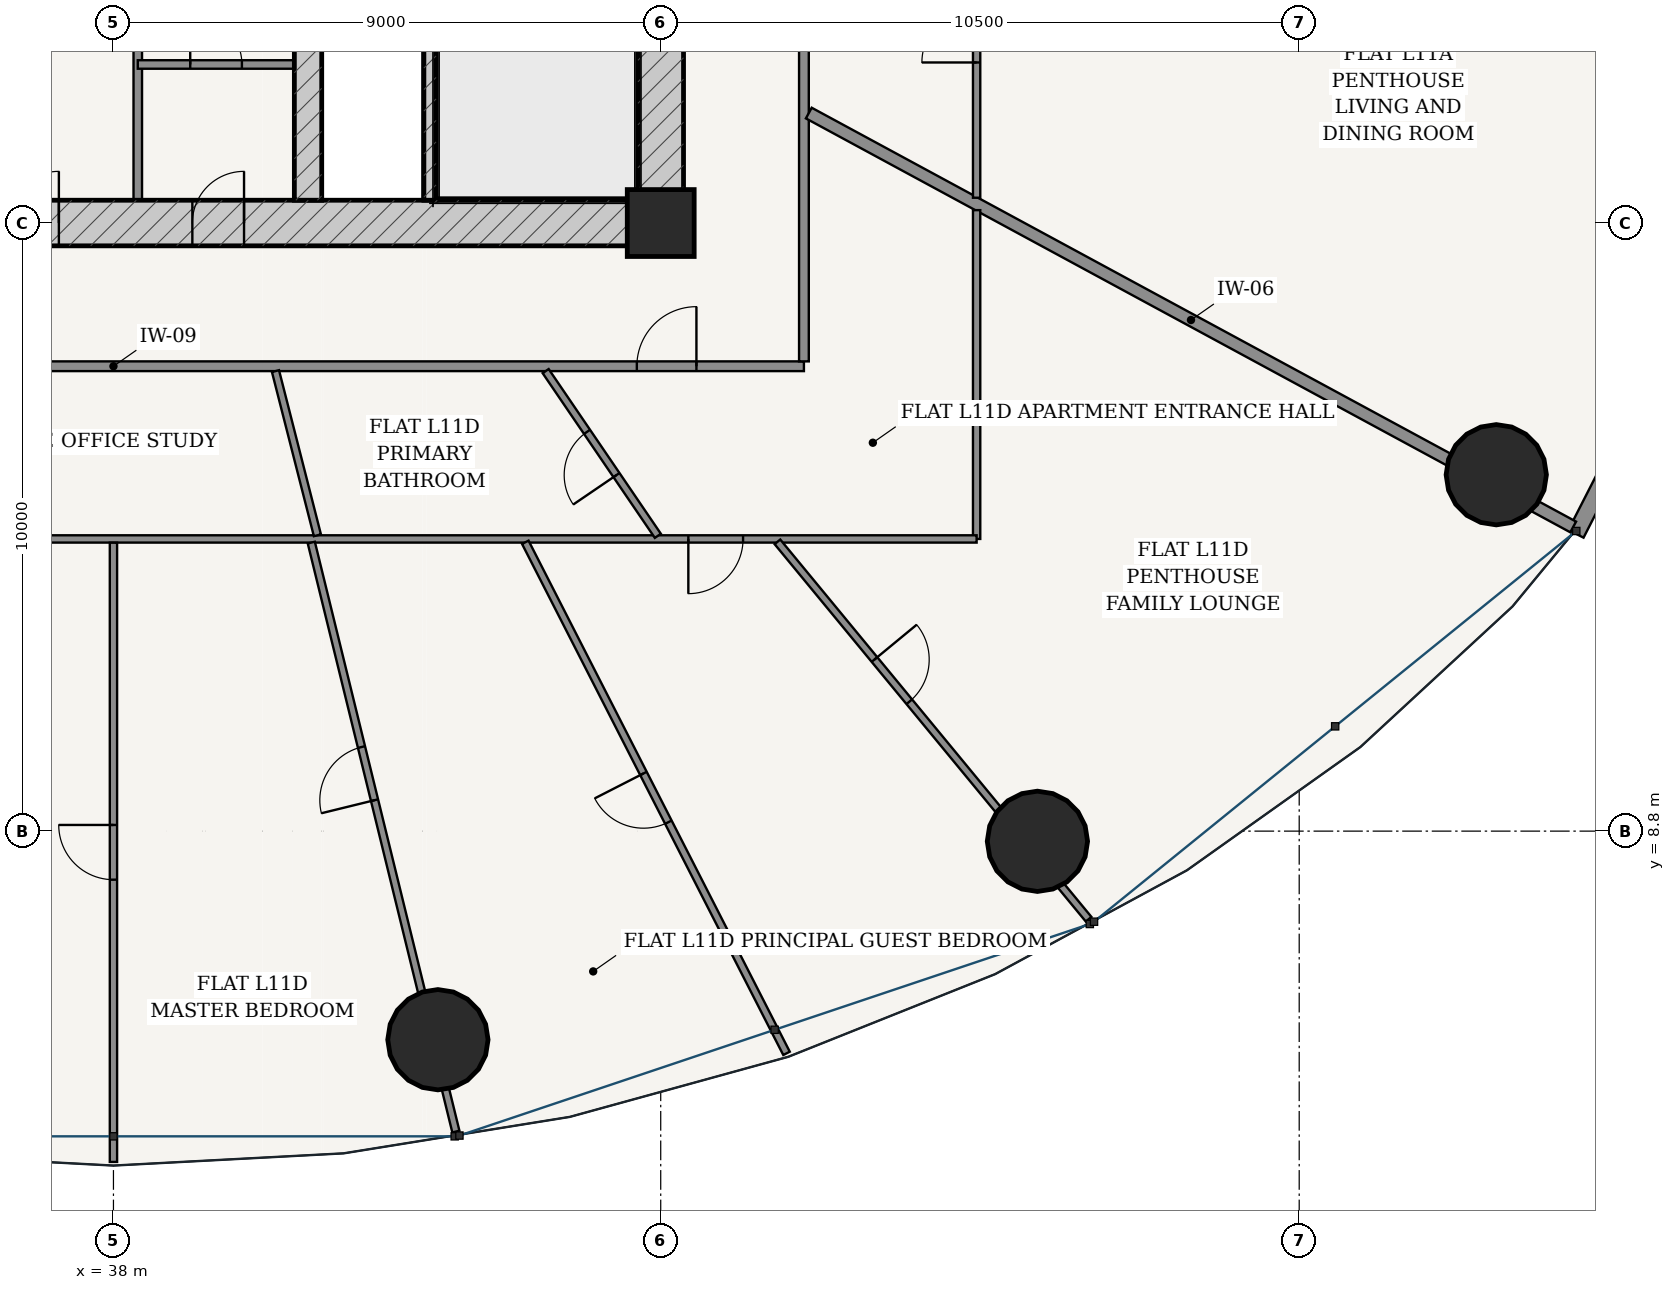
"""IFC4 building model, lengths in metres.
Left out: names, types, materials, properties, quantities, classifications, styles, units other than length and angle.
Written with IfcOpenShell. Run it as: python <this file> out.ifc"""

import sys

from ifc_helpers import new_model, si_unit, direction, frame, frame_2d, origin, origin_2d, place, context, subcontext, project, spatial, rectangle, hollow_circle, extrude, source, transform, mapped, element, fill, save


model = new_model("IFC4")
c1 = context("Model", 3, precision=1e-05, world=origin(), true_north=direction((-0.2419218956, 0.970295726276)))
c2 = subcontext(c1, "Body", "Model", "MODEL_VIEW")
j1 = project(units=[si_unit("LENGTHUNIT", "METRE"), si_unit("PLANEANGLEUNIT", "RADIAN")], contexts=[c1])
p1 = place(None, origin())
s1 = spatial("IfcSite", under=j1, at=p1, CompositionType="ELEMENT")
p2 = place(p1, origin())
s2 = spatial("IfcBuilding", under=s1, at=p2, CompositionType="ELEMENT")
p3 = place(p2, frame((0.0, 0.0, 45.6)))
s3 = spatial("IfcBuildingStorey", under=s2, at=p3, CompositionType="ELEMENT", Elevation=45.6)
p4 = place(p3, frame((47.0, 18.8, 0.0), z_axis=(0.0, 0.0, 1.0), x_axis=(1.0, 0.0, 0.0)))
e1 = element("IfcColumn", 1, at=p4, inside=s3, PredefinedType="COLUMN", context=c2, shape_type="SweptSolid", body=[
    extrude(rectangle(XDim=1.1, YDim=1.1, at=origin_2d()), origin(), (0.0, 0.0, 1.0), 3.6),
])
p5 = place(p3, frame((28.625, 18.8, 0.0), z_axis=(0.0, 0.0, 1.0), x_axis=(1.0, 0.0, 0.0)))
e2 = element("IfcWall", 2, at=p5, inside=s3, PredefinedType="SHEAR", context=c2, shape_type="SweptSolid", body=[
    extrude(rectangle(XDim=18.75, YDim=0.75, at=frame_2d((9.375, 0.0))), origin(), (0.0, 0.0, 1.0), 3.32),
])
p6 = place(p5, frame((7.627, 0.0, 0.0)))
e3 = element("IfcOpeningElement", 3, at=p6, cuts=e2, PredefinedType="OPENING", context=c2, shape_type="SweptSolid", body=[
    extrude(rectangle(XDim=0.85, YDim=2.1, at=frame_2d((0.425, 1.05))), frame((0.0, 0.385, 0.0), z_axis=(0.0, -1.0, 0.0), x_axis=(1.0, 0.0, 0.0)), (0.0, 0.0, 1.0), 0.77),
])
p7 = place(p5, frame((10.673, 0.0, 0.0)))
e4 = element("IfcOpeningElement", 4, at=p7, cuts=e2, PredefinedType="OPENING", context=c2, shape_type="SweptSolid", body=[
    extrude(rectangle(XDim=0.85, YDim=2.1, at=frame_2d((0.425, 1.05))), frame((0.0, 0.385, 0.0), z_axis=(0.0, -1.0, 0.0), x_axis=(1.0, 0.0, 0.0)), (0.0, 0.0, 1.0), 0.77),
])
p8 = place(p3, frame((47.0, 19.175, 0.0), z_axis=(0.0, 0.0, 1.0), x_axis=(0.0, 1.0, 0.0)))
e5 = element("IfcWall", 5, at=p8, inside=s3, PredefinedType="SHEAR", context=c2, shape_type="SweptSolid", body=[
    extrude(rectangle(XDim=15.25, YDim=0.75, at=frame_2d((7.625, 0.0))), origin(), (0.0, 0.0, 1.0), 3.32),
])
p9 = place(p8, frame((9.875, 0.0, 0.0)))
e6 = element("IfcOpeningElement", 6, at=p9, cuts=e5, PredefinedType="OPENING", context=c2, shape_type="SweptSolid", body=[
    extrude(rectangle(XDim=1.5, YDim=2.2, at=frame_2d((0.75, 1.1))), frame((0.0, 0.385, 0.0), z_axis=(0.0, -1.0, 0.0), x_axis=(1.0, 0.0, 0.0)), (0.0, 0.0, 1.0), 0.77),
])
p10 = place(p3, frame((43.205, 19.175, 0.0), z_axis=(0.0, 0.0, 1.0), x_axis=(0.0, 1.0, 0.0)))
e7 = element("IfcWall", 7, at=p10, inside=s3, PredefinedType="SOLIDWALL", context=c2, shape_type="SweptSolid", body=[
    extrude(rectangle(XDim=7.375, YDim=0.2, at=frame_2d((3.688, 0.0))), origin(), (0.0, 0.0, 1.0), 3.32),
])
p11 = place(p3, frame((41.2, 19.175, 0.0), z_axis=(0.0, 0.0, 1.0), x_axis=(0.0, 1.0, 0.0)))
e8 = element("IfcWall", 8, at=p11, inside=s3, PredefinedType="SHEAR", context=c2, shape_type="SweptSolid", body=[
    extrude(rectangle(XDim=15.25, YDim=0.45, at=frame_2d((7.625, 0.0))), origin(), (0.0, 0.0, 1.0), 3.32),
])
p12 = place(p11, frame((7.8, 0.0, 0.0)))
e9 = element("IfcOpeningElement", 9, at=p12, cuts=e8, PredefinedType="OPENING", context=c2, shape_type="SweptSolid", body=[
    extrude(rectangle(XDim=1.05, YDim=2.15, at=frame_2d((0.525, 1.075))), frame((0.0, 0.235, 0.0), z_axis=(0.0, -1.0, 0.0), x_axis=(1.0, 0.0, 0.0)), (0.0, 0.0, 1.0), 0.47),
])
for number, where, z_axis, x_axis in (
    (10, (43.336, 5.37, 0.0), (0.0, 0.0, 1.0), (1.0, 0.0, 0.0)),
    (11, (53.195, 8.632, 0.0), (0.0, 0.0, 1.0), (1.0, 0.0, 0.0)),
    (12, (60.741, 14.661, 0.0), (0.0, 0.0, 1.0), (1.0, 0.0, 0.0)),
):
    element("IfcColumn", number, at=place(p3, frame(where, z_axis=z_axis, x_axis=x_axis)), inside=s3, PredefinedType="COLUMN", context=c2, shape_type="SweptSolid", body=[
        extrude(hollow_circle(Radius=0.825, WallThickness=0.05, at=origin_2d()), origin(), (0.0, 0.0, 1.0), 3.6),
    ])
p13 = place(p3, frame((62.051, 13.689, 0.0), z_axis=(0.0, 0.0, 1.0), x_axis=(0.455220575541, 0.890378698984, 0.0)))
e13 = element("IfcWall", 13, at=p13, inside=s3, PredefinedType="SOLIDWALL", context=c2, shape_type="SweptSolid", body=[
    extrude(rectangle(XDim=9.662, YDim=0.28, at=frame_2d((4.831, 0.0))), origin(), (0.0, 0.0, 1.0), 3.32),
])
p14 = place(p13, frame((1.559, 0.0, 0.85)))
e14 = element("IfcOpeningElement", 14, at=p14, cuts=e13, PredefinedType="OPENING", context=c2, shape_type="SweptSolid", body=[
    extrude(rectangle(XDim=2.1, YDim=1.95, at=frame_2d((1.05, 0.975))), frame((0.0, 0.15, 0.0), z_axis=(0.0, -1.0, 0.0), x_axis=(1.0, 0.0, 0.0)), (0.0, 0.0, 1.0), 0.3),
])
p15 = place(p13, frame((6.003, 0.0, 0.85)))
e15 = element("IfcOpeningElement", 15, at=p15, cuts=e13, PredefinedType="OPENING", context=c2, shape_type="SweptSolid", body=[
    extrude(rectangle(XDim=2.1, YDim=1.95, at=frame_2d((1.05, 0.975))), frame((0.0, 0.15, 0.0), z_axis=(0.0, -1.0, 0.0), x_axis=(1.0, 0.0, 0.0)), (0.0, 0.0, 1.0), 0.3),
])
p16 = place(p3, frame((38.4, 19.175, 0.0), z_axis=(0.0, 0.0, 1.0), x_axis=(0.0, 1.0, 0.0)))
e16 = element("IfcWall", 16, at=p16, inside=s3, PredefinedType="PARTITIONING", context=c2, shape_type="SweptSolid", body=[
    extrude(rectangle(XDim=4.465, YDim=0.14, at=frame_2d((2.232, 0.0))), origin(), (0.0, 0.0, 1.0), 3.32),
])
p17 = place(p3, frame((38.4, 21.407, 0.0), z_axis=(0.0, 0.0, 1.0), x_axis=(1.0, 0.0, 0.0)))
e17 = element("IfcWall", 17, at=p17, inside=s3, PredefinedType="PARTITIONING", context=c2, shape_type="SweptSolid", body=[
    extrude(rectangle(XDim=2.575, YDim=0.14, at=frame_2d((1.288, 0.0))), origin(), (0.0, 0.0, 1.0), 3.32),
])
p18 = place(p17, frame((0.863, 0.0, 0.0)))
e18 = element("IfcOpeningElement", 18, at=p18, cuts=e17, PredefinedType="OPENING", context=c2, shape_type="SweptSolid", body=[
    extrude(rectangle(XDim=0.85, YDim=2.1, at=frame_2d((0.425, 1.05))), frame((0.0, 0.08, 0.0), z_axis=(0.0, -1.0, 0.0), x_axis=(1.0, 0.0, 0.0)), (0.0, 0.0, 1.0), 0.16),
])
p19 = place(p3, frame((26.645, 16.445, 0.0), z_axis=(0.0, 0.0, 1.0), x_axis=(1.0, 0.0, 0.0)))
e19 = element("IfcWall", 19, at=p19, inside=s3, PredefinedType="PARTITIONING", context=c2, shape_type="SweptSolid", body=[
    extrude(rectangle(XDim=22.71, YDim=0.16, at=frame_2d((11.355, 0.0))), origin(), (0.0, 0.0, 1.0), 2.688),
])
p20 = place(p19, frame((19.962, 0.0, 0.0)))
e20 = element("IfcOpeningElement", 20, at=p20, cuts=e19, PredefinedType="OPENING", context=c2, shape_type="SweptSolid", body=[
    extrude(rectangle(XDim=0.98, YDim=2.2, at=frame_2d((0.49, 1.1))), frame((0.0, 0.09, 0.0), z_axis=(0.0, -1.0, 0.0), x_axis=(1.0, 0.0, 0.0)), (0.0, 0.0, 1.0), 0.18),
])
p21 = place(p3, frame((49.355, 16.525, 0.0), z_axis=(0.0, 0.0, 1.0), x_axis=(0.0, 1.0, 0.0)))
e21 = element("IfcWall", 21, at=p21, inside=s3, PredefinedType="PARTITIONING", context=c2, shape_type="SweptSolid", body=[
    extrude(rectangle(XDim=20.55, YDim=0.16, at=frame_2d((10.275, 0.0))), origin(), (0.0, 0.0, 1.0), 2.688),
])
p22 = place(p3, frame((49.435, 20.608, 0.0), z_axis=(0.0, 0.0, 1.0), x_axis=(0.879369737803, -0.476139542819, 0.0)))
e22 = element("IfcWall", 22, at=p22, inside=s3, PredefinedType="PARTITIONING", context=c2, shape_type="SweptSolid", body=[
    extrude(rectangle(XDim=14.295, YDim=0.2, at=frame_2d((7.147, 0.0))), origin(), (0.0, 0.0, 1.0), 2.688),
])
p23 = place(p3, frame((52.195, 39.995, 0.0), z_axis=(0.0, 0.0, 1.0), x_axis=(0.0, -1.0, 0.0)))
e23 = element("IfcWall", 23, at=p23, inside=s3, PredefinedType="PARTITIONING", context=c2, shape_type="SweptSolid", body=[
    extrude(rectangle(XDim=20.779, YDim=0.12, at=frame_2d((10.39, 0.0))), origin(), (0.0, 0.0, 1.0), 2.688),
])
p24 = place(p23, frame((13.944, 0.0, 0.0)))
e24 = element("IfcOpeningElement", 24, at=p24, cuts=e23, PredefinedType="OPENING", context=c2, shape_type="SweptSolid", body=[
    extrude(rectangle(XDim=0.9, YDim=2.15, at=frame_2d((0.45, 1.075))), frame((0.0, 0.07, 0.0), z_axis=(0.0, -1.0, 0.0), x_axis=(1.0, 0.0, 0.0)), (0.0, 0.0, 1.0), 0.14),
])
p25 = place(p23, frame((17.655, 0.0, 0.0)))
e25 = element("IfcOpeningElement", 25, at=p25, cuts=e23, PredefinedType="OPENING", context=c2, shape_type="SweptSolid", body=[
    extrude(rectangle(XDim=0.9, YDim=2.15, at=frame_2d((0.45, 1.075))), frame((0.0, 0.07, 0.0), z_axis=(0.0, -1.0, 0.0), x_axis=(1.0, 0.0, 0.0)), (0.0, 0.0, 1.0), 0.14),
])
p26 = place(p3, frame((52.195, 19.012, 0.0), z_axis=(0.0, 0.0, 1.0), x_axis=(0.0, -1.0, 0.0)))
e26 = element("IfcWall", 26, at=p26, inside=s3, PredefinedType="PARTITIONING", context=c2, shape_type="SweptSolid", body=[
    extrude(rectangle(XDim=5.407, YDim=0.12, at=frame_2d((2.704, 0.0))), origin(), (0.0, 0.0, 1.0), 2.999),
])
p27 = place(p3, frame((52.195, 13.605, 0.0), z_axis=(0.0, 0.0, 1.0), x_axis=(-1.0, 0.0, 0.0)))
e27 = element("IfcWall", 27, at=p27, inside=s3, PredefinedType="PARTITIONING", context=c2, shape_type="SweptSolid", body=[
    extrude(rectangle(XDim=24.973, YDim=0.12, at=frame_2d((12.487, 0.0))), origin(), (0.0, 0.0, 1.0), 2.688),
])
p28 = place(p27, frame((3.841, 0.0, 0.0)))
e28 = element("IfcOpeningElement", 28, at=p28, cuts=e27, PredefinedType="OPENING", context=c2, shape_type="SweptSolid", body=[
    extrude(rectangle(XDim=0.9, YDim=2.15, at=frame_2d((0.45, 1.075))), frame((0.0, 0.07, 0.0), z_axis=(0.0, -1.0, 0.0), x_axis=(1.0, 0.0, 0.0)), (0.0, 0.0, 1.0), 0.14),
])
p29 = place(p27, frame((15.819, 0.0, 0.0)))
e29 = element("IfcOpeningElement", 29, at=p29, cuts=e27, PredefinedType="OPENING", context=c2, shape_type="SweptSolid", body=[
    extrude(rectangle(XDim=0.9, YDim=2.15, at=frame_2d((0.45, 1.075))), frame((0.0, 0.07, 0.0), z_axis=(0.0, -1.0, 0.0), x_axis=(1.0, 0.0, 0.0)), (0.0, 0.0, 1.0), 0.14),
])
p30 = place(p27, frame((21.123, 0.0, 0.0)))
e30 = element("IfcOpeningElement", 30, at=p30, cuts=e27, PredefinedType="OPENING", context=c2, shape_type="SweptSolid", body=[
    extrude(rectangle(XDim=0.9, YDim=2.15, at=frame_2d((0.45, 1.075))), frame((0.0, 0.07, 0.0), z_axis=(0.0, -1.0, 0.0), x_axis=(1.0, 0.0, 0.0)), (0.0, 0.0, 1.0), 0.14),
])
p31 = place(p3, frame((38.0, 13.543, 0.0), z_axis=(0.0, 0.0, 1.0), x_axis=(0.0, -1.0, 0.0)))
e31 = element("IfcWall", 31, at=p31, inside=s3, PredefinedType="PARTITIONING", context=c2, shape_type="SweptSolid", body=[
    extrude(rectangle(XDim=10.183, YDim=0.12, at=frame_2d((5.091, 0.0))), origin(), (0.0, 0.0, 1.0), 2.762),
])
p32 = place(p31, frame((4.642, 0.0, 0.0)))
e32 = element("IfcOpeningElement", 32, at=p32, cuts=e31, PredefinedType="OPENING", context=c2, shape_type="SweptSolid", body=[
    extrude(rectangle(XDim=0.9, YDim=2.15, at=frame_2d((0.45, 1.075))), frame((0.0, 0.07, 0.0), z_axis=(0.0, -1.0, 0.0), x_axis=(1.0, 0.0, 0.0)), (0.0, 0.0, 1.0), 0.14),
])
p33 = place(p3, frame((41.254, 13.545, 0.0), z_axis=(0.0, 0.0, 1.0), x_axis=(0.238391877067, -0.971169044476, 0.0)))
e33 = element("IfcWall", 33, at=p33, inside=s3, PredefinedType="PARTITIONING", context=c2, shape_type="SweptSolid", body=[
    extrude(rectangle(XDim=9.973, YDim=0.12, at=frame_2d((4.986, 0.0))), origin(), (0.0, 0.0, 1.0), 2.688),
])
p34 = place(p33, frame((3.462, 0.0, 0.0)))
e34 = element("IfcOpeningElement", 34, at=p34, cuts=e33, PredefinedType="OPENING", context=c2, shape_type="SweptSolid", body=[
    extrude(rectangle(XDim=0.9, YDim=2.15, at=frame_2d((0.45, 1.075))), frame((0.0, 0.07, 0.0), z_axis=(0.0, -1.0, 0.0), x_axis=(1.0, 0.0, 0.0)), (0.0, 0.0, 1.0), 0.14),
])
p35 = place(p3, frame((44.773, 13.55, 0.0), z_axis=(0.0, 0.0, 1.0), x_axis=(0.455131567849, -0.890424200001, 0.0)))
e35 = element("IfcWall", 35, at=p35, inside=s3, PredefinedType="PARTITIONING", context=c2, shape_type="SweptSolid", body=[
    extrude(rectangle(XDim=9.439, YDim=0.12, at=frame_2d((4.719, 0.0))), origin(), (0.0, 0.0, 1.0), 2.762),
])
p36 = place(p35, frame((4.269, 0.0, 0.0)))
e36 = element("IfcOpeningElement", 36, at=p36, cuts=e35, PredefinedType="OPENING", context=c2, shape_type="SweptSolid", body=[
    extrude(rectangle(XDim=0.9, YDim=2.15, at=frame_2d((0.45, 1.075))), frame((0.0, 0.07, 0.0), z_axis=(0.0, -1.0, 0.0), x_axis=(1.0, 0.0, 0.0)), (0.0, 0.0, 1.0), 0.14),
])
p37 = place(p3, frame((48.919, 13.557, 0.0), z_axis=(0.0, 0.0, 1.0), x_axis=(0.636193310573, -0.771529695852, 0.0)))
e37 = element("IfcWall", 37, at=p37, inside=s3, PredefinedType="PARTITIONING", context=c2, shape_type="SweptSolid", body=[
    extrude(rectangle(XDim=8.044, YDim=0.12, at=frame_2d((4.022, 0.0))), origin(), (0.0, 0.0, 1.0), 2.688),
])
p38 = place(p37, frame((2.508, 0.0, 0.0)))
e38 = element("IfcOpeningElement", 38, at=p38, cuts=e37, PredefinedType="OPENING", context=c2, shape_type="SweptSolid", body=[
    extrude(rectangle(XDim=0.9, YDim=2.15, at=frame_2d((0.45, 1.075))), frame((0.0, 0.07, 0.0), z_axis=(0.0, -1.0, 0.0), x_axis=(1.0, 0.0, 0.0)), (0.0, 0.0, 1.0), 0.14),
])
p39 = place(p3, frame((40.665, 16.365, 0.0), z_axis=(0.0, 0.0, 1.0), x_axis=(0.2474182455, -0.968908773721, 0.0)))
e39 = element("IfcWall", 39, at=p39, inside=s3, PredefinedType="PARTITIONING", context=c2, shape_type="SweptSolid", body=[
    extrude(rectangle(XDim=2.787, YDim=0.12, at=frame_2d((1.393, 0.0))), origin(), (0.0, 0.0, 1.0), 2.688),
])
p40 = place(p3, frame((45.108, 16.365, 0.0), z_axis=(0.0, 0.0, 1.0), x_axis=(0.562992379509, -0.826462086617, 0.0)))
e40 = element("IfcWall", 40, at=p40, inside=s3, PredefinedType="PARTITIONING", context=c2, shape_type="SweptSolid", body=[
    extrude(rectangle(XDim=3.278, YDim=0.12, at=frame_2d((1.639, 0.0))), origin(), (0.0, 0.0, 1.0), 3.32),
])
p41 = place(p40, frame((1.209, 0.0, 0.0)))
e41 = element("IfcOpeningElement", 41, at=p41, cuts=e40, PredefinedType="OPENING", context=c2, shape_type="SweptSolid", body=[
    extrude(rectangle(XDim=0.86, YDim=2.15, at=frame_2d((0.43, 1.075))), frame((0.0, 0.07, 0.0), z_axis=(0.0, -1.0, 0.0), x_axis=(1.0, 0.0, 0.0)), (0.0, 0.0, 1.0), 0.14),
])
m1 = source(origin(), c2, "Body", "SweptSolid", [
    extrude(rectangle(XDim=0.85, YDim=2.1, at=frame_2d((0.425, 1.05))), frame((0.0, 0.025, 0.0), z_axis=(0.0, -1.0, 0.0), x_axis=(1.0, 0.0, 0.0)), (0.0, 0.0, 1.0), 0.05),
])
p42 = place(p6, origin())
e42 = element("IfcDoor", 42, at=p42, inside=s3, OperationType="SINGLE_SWING_RIGHT", PredefinedType="DOOR", context=c2, shape_type="MappedRepresentation", body=[
    mapped(m1, transform((0.0, 0.0, 0.0), scale=1.0)),
])
fill(e3, e42)
p43 = place(p7, origin())
e43 = element("IfcDoor", 43, at=p43, inside=s3, OperationType="SINGLE_SWING_RIGHT", PredefinedType="DOOR", context=c2, shape_type="MappedRepresentation", body=[
    mapped(m1, transform((0.0, 0.0, 0.0), scale=1.0)),
])
fill(e4, e43)
p44 = place(p18, origin())
e44 = element("IfcDoor", 44, at=p44, inside=s3, OperationType="SINGLE_SWING_LEFT", PredefinedType="DOOR", context=c2, shape_type="MappedRepresentation", body=[
    mapped(m1, transform((0.0, 0.0, 0.0), scale=1.0)),
])
fill(e18, e44)
m2 = source(origin(), c2, "Body", "SweptSolid", [
    extrude(rectangle(XDim=0.9, YDim=2.15, at=frame_2d((0.45, 1.075))), frame((0.0, 0.025, 0.0), z_axis=(0.0, -1.0, 0.0), x_axis=(1.0, 0.0, 0.0)), (0.0, 0.0, 1.0), 0.05),
])
p45 = place(p25, frame((0.9, 0.0, 0.0), z_axis=(0.0, 0.0, 1.0), x_axis=(-1.0, 0.0, 0.0)))
e45 = element("IfcDoor", 45, at=p45, inside=s3, OperationType="SINGLE_SWING_LEFT", PredefinedType="DOOR", context=c2, shape_type="MappedRepresentation", body=[
    mapped(m2, transform((0.0, 0.0, 0.0), scale=1.0)),
])
fill(e25, e45)
m3 = source(origin(), c2, "Body", "SweptSolid", [
    extrude(rectangle(XDim=0.98, YDim=2.2, at=frame_2d((0.49, 1.1))), frame((0.0, 0.025, 0.0), z_axis=(0.0, -1.0, 0.0), x_axis=(1.0, 0.0, 0.0)), (0.0, 0.0, 1.0), 0.05),
])
p46 = place(p20, origin())
e46 = element("IfcDoor", 46, at=p46, inside=s3, OperationType="SINGLE_SWING_RIGHT", PredefinedType="DOOR", context=c2, shape_type="MappedRepresentation", body=[
    mapped(m3, transform((0.0, 0.0, 0.0), scale=1.0)),
])
fill(e20, e46)
m4 = source(origin(), c2, "Body", "SweptSolid", [
    extrude(rectangle(XDim=0.86, YDim=2.15, at=frame_2d((0.43, 1.075))), frame((0.0, 0.025, 0.0), z_axis=(0.0, -1.0, 0.0), x_axis=(1.0, 0.0, 0.0)), (0.0, 0.0, 1.0), 0.05),
])
p47 = place(p41, frame((0.86, 0.0, 0.0), z_axis=(0.0, 0.0, 1.0), x_axis=(-1.0, 0.0, 0.0)))
e47 = element("IfcDoor", 47, at=p47, inside=s3, OperationType="SINGLE_SWING_LEFT", PredefinedType="DOOR", context=c2, shape_type="MappedRepresentation", body=[
    mapped(m4, transform((0.0, 0.0, 0.0), scale=1.0)),
])
fill(e41, e47)
p48 = place(p28, origin())
e48 = element("IfcDoor", 48, at=p48, inside=s3, OperationType="SINGLE_SWING_RIGHT", PredefinedType="DOOR", context=c2, shape_type="MappedRepresentation", body=[
    mapped(m2, transform((0.0, 0.0, 0.0), scale=1.0)),
])
fill(e28, e48)
p49 = place(p38, origin())
e49 = element("IfcDoor", 49, at=p49, inside=s3, OperationType="SINGLE_SWING_LEFT", PredefinedType="DOOR", context=c2, shape_type="MappedRepresentation", body=[
    mapped(m2, transform((0.0, 0.0, 0.0), scale=1.0)),
])
fill(e38, e49)
p50 = place(p36, frame((0.9, 0.0, 0.0), z_axis=(0.0, 0.0, 1.0), x_axis=(-1.0, 0.0, 0.0)))
e50 = element("IfcDoor", 50, at=p50, inside=s3, OperationType="SINGLE_SWING_RIGHT", PredefinedType="DOOR", context=c2, shape_type="MappedRepresentation", body=[
    mapped(m2, transform((0.0, 0.0, 0.0), scale=1.0)),
])
fill(e36, e50)
p51 = place(p34, frame((0.9, 0.0, 0.0), z_axis=(0.0, 0.0, 1.0), x_axis=(-1.0, 0.0, 0.0)))
e51 = element("IfcDoor", 51, at=p51, inside=s3, OperationType="SINGLE_SWING_LEFT", PredefinedType="DOOR", context=c2, shape_type="MappedRepresentation", body=[
    mapped(m2, transform((0.0, 0.0, 0.0), scale=1.0)),
])
fill(e34, e51)
p52 = place(p32, frame((0.9, 0.0, 0.0), z_axis=(0.0, 0.0, 1.0), x_axis=(-1.0, 0.0, 0.0)))
e52 = element("IfcDoor", 52, at=p52, inside=s3, OperationType="SINGLE_SWING_RIGHT", PredefinedType="DOOR", context=c2, shape_type="MappedRepresentation", body=[
    mapped(m2, transform((0.0, 0.0, 0.0), scale=1.0)),
])
fill(e32, e52)
save(model, sys.argv[1])
